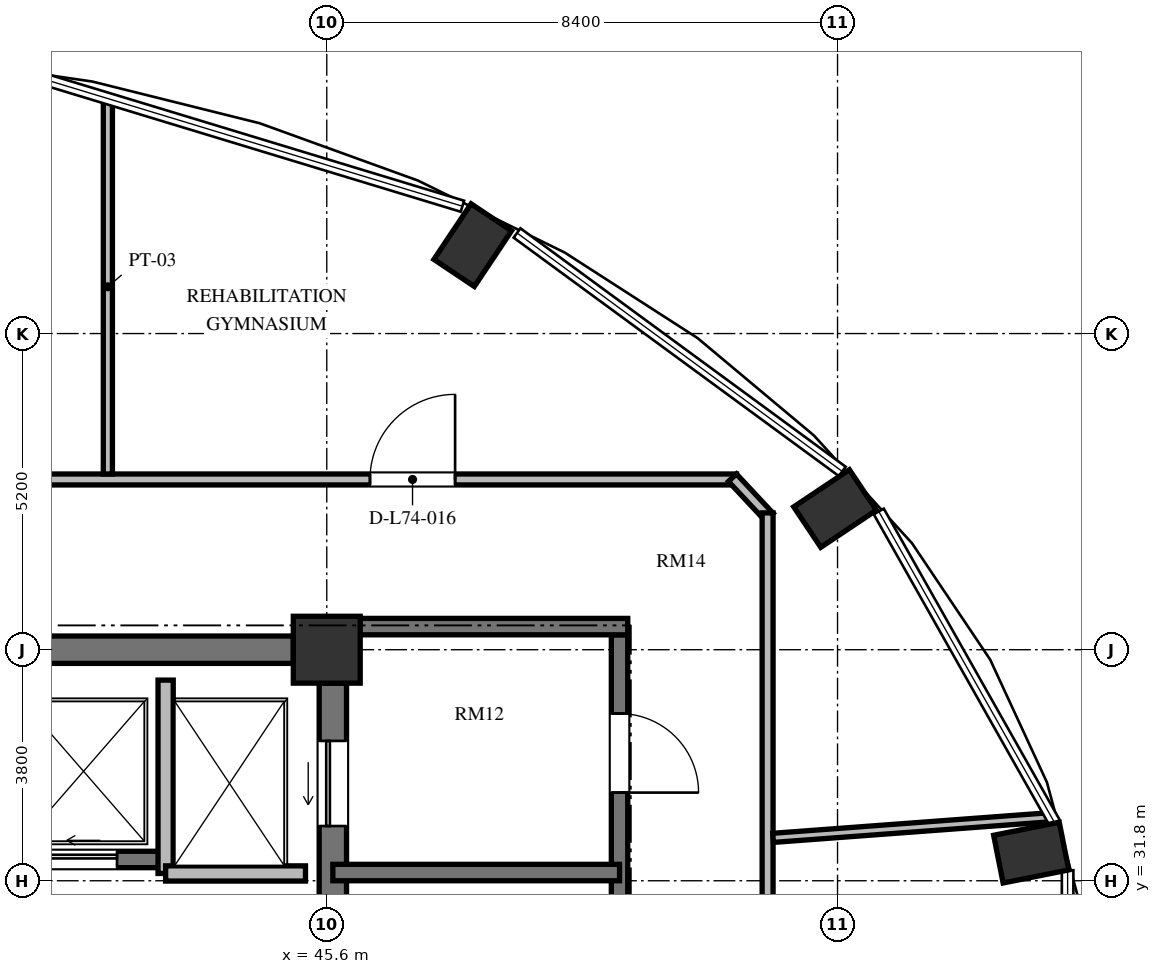
"""IFC4 building model, lengths in metres.
Left out: names, types, materials, properties, quantities, classifications, styles, units other than length and angle.
Written with IfcOpenShell. Run it as: python <this file> out.ifc"""

import sys

from ifc_helpers import new_model, si_unit, direction, frame, frame_2d, origin, origin_2d, place, context, subcontext, project, spatial, rectangle, extrude, element, fill, save


model = new_model("IFC4")
c1 = context("Model", 3, precision=1e-05, world=origin(), true_north=direction((0.0, 1.0)))
c2 = subcontext(c1, "Body", "Model", "MODEL_VIEW")
j1 = project(units=[si_unit("LENGTHUNIT", "METRE"), si_unit("PLANEANGLEUNIT", "RADIAN")], contexts=[c1])
p1 = place(None, origin())
s1 = spatial("IfcSite", under=j1, at=p1, CompositionType="ELEMENT")
p2 = place(p1, origin())
s2 = spatial("IfcBuilding", under=s1, at=p2, CompositionType="ELEMENT")
p3 = place(p2, frame((0.0, 0.0, 284.208)))
s3 = spatial("IfcBuildingStorey", under=s2, at=p3, CompositionType="ELEMENT", Elevation=284.208)
for number, where, z_axis, x_axis in (
    (1, (57.185, 32.263, 0.0), (0.0, 0.0, 1.0), (0.981, 0.195, 0.0)),
    (2, (53.96, 37.923, 0.0), (0.0, 0.0, 1.0), (0.831, 0.556, 0.0)),
    (3, (48.0, 42.254, 0.0), (0.0, 0.0, 1.0), (0.556, 0.831, 0.0)),
):
    element("IfcColumn", number, at=place(p3, frame(where, z_axis=z_axis, x_axis=x_axis)), inside=s3, PredefinedType="COLUMN", context=c2, shape_type="SweptSolid", body=[
        extrude(rectangle(XDim=1.1, YDim=0.8, at=origin_2d()), origin(), (0.0, 0.0, 1.0), 3.648),
    ])
p4 = place(p3, frame((45.6, 35.6, 0.0), z_axis=(0.0, 0.0, 1.0), x_axis=(1.0, 0.0, 0.0)))
e4 = element("IfcColumn", 4, at=p4, inside=s3, PredefinedType="COLUMN", context=c2, shape_type="SweptSolid", body=[
    extrude(rectangle(XDim=1.1, YDim=1.1, at=origin_2d()), origin(), (0.0, 0.0, 1.0), 3.648),
])
p5 = place(p3, frame((45.7, 20.95, 0.0), z_axis=(0.0, 0.0, 1.0), x_axis=(0.0, 1.0, 0.0)))
e5 = element("IfcWall", 5, at=p5, inside=s3, PredefinedType="SHEAR", context=c2, shape_type="SweptSolid", body=[
    extrude(rectangle(XDim=14.1, YDim=0.45, at=frame_2d((7.05, 0.0))), origin(), (0.0, 0.0, 1.0), 3.648),
])
p6 = place(p5, frame((11.75, 0.0, 0.0)))
e6 = element("IfcOpeningElement", 6, at=p6, cuts=e5, PredefinedType="OPENING", context=c2, shape_type="SweptSolid", body=[
    extrude(rectangle(XDim=1.4, YDim=2.3, at=frame_2d((0.7, 1.15))), frame((0.0, 0.235, 0.0), z_axis=(0.0, -1.0, 0.0), x_axis=(1.0, 0.0, 0.0)), (0.0, 0.0, 1.0), 0.47),
])
p7 = place(p5, frame((0.95, 0.0, 0.0)))
e7 = element("IfcOpeningElement", 7, at=p7, cuts=e5, PredefinedType="OPENING", context=c2, shape_type="SweptSolid", body=[
    extrude(rectangle(XDim=1.4, YDim=2.3, at=frame_2d((0.7, 1.15))), frame((0.0, 0.235, 0.0), z_axis=(0.0, -1.0, 0.0), x_axis=(1.0, 0.0, 0.0)), (0.0, 0.0, 1.0), 0.47),
])
p8 = place(p3, frame((39.6, 35.6, 0.0), z_axis=(0.0, 0.0, 1.0), x_axis=(1.0, 0.0, 0.0)))
e8 = element("IfcWall", 8, at=p8, inside=s3, PredefinedType="SHEAR", context=c2, shape_type="SweptSolid", body=[
    extrude(rectangle(XDim=5.45, YDim=0.45, at=frame_2d((2.725, 0.0))), origin(), (0.0, 0.0, 1.0), 3.648),
])
p9 = place(p3, frame((26.55, 32.15, 0.0), z_axis=(0.0, 0.0, 1.0), x_axis=(1.0, 0.0, 0.0)))
e9 = element("IfcWall", 9, at=p9, inside=s3, PredefinedType="SHEAR", context=c2, shape_type="SweptSolid", body=[
    extrude(rectangle(XDim=16.4, YDim=0.27, at=frame_2d((8.2, 0.0))), origin(), (0.0, 0.0, 1.0), 3.648),
])
p10 = place(p9, frame((1.375, 0.0, 0.0)))
e10 = element("IfcOpeningElement", 10, at=p10, cuts=e9, PredefinedType="OPENING", context=c2, shape_type="SweptSolid", body=[
    extrude(rectangle(XDim=1.05, YDim=2.15, at=frame_2d((0.525, 1.075))), frame((0.0, 0.145, 0.0), z_axis=(0.0, -1.0, 0.0), x_axis=(1.0, 0.0, 0.0)), (0.0, 0.0, 1.0), 0.29),
])
p11 = place(p9, frame((4.975, 0.0, 0.0)))
e11 = element("IfcOpeningElement", 11, at=p11, cuts=e9, PredefinedType="OPENING", context=c2, shape_type="SweptSolid", body=[
    extrude(rectangle(XDim=1.05, YDim=2.15, at=frame_2d((0.525, 1.075))), frame((0.0, 0.145, 0.0), z_axis=(0.0, -1.0, 0.0), x_axis=(1.0, 0.0, 0.0)), (0.0, 0.0, 1.0), 0.29),
])
p12 = place(p9, frame((8.625, 0.0, 0.0)))
e12 = element("IfcOpeningElement", 12, at=p12, cuts=e9, PredefinedType="OPENING", context=c2, shape_type="SweptSolid", body=[
    extrude(rectangle(XDim=1.05, YDim=2.15, at=frame_2d((0.525, 1.075))), frame((0.0, 0.145, 0.0), z_axis=(0.0, -1.0, 0.0), x_axis=(1.0, 0.0, 0.0)), (0.0, 0.0, 1.0), 0.29),
])
p13 = place(p9, frame((11.9, 0.0, 0.0)))
e13 = element("IfcOpeningElement", 13, at=p13, cuts=e9, PredefinedType="OPENING", context=c2, shape_type="SweptSolid", body=[
    extrude(rectangle(XDim=1.1, YDim=2.2, at=frame_2d((0.55, 1.1))), frame((0.0, 0.145, 0.0), z_axis=(0.0, -1.0, 0.0), x_axis=(1.0, 0.0, 0.0)), (0.0, 0.0, 1.0), 0.29),
])
p14 = place(p9, frame((14.5, 0.0, 0.0)))
e14 = element("IfcOpeningElement", 14, at=p14, cuts=e9, PredefinedType="OPENING", context=c2, shape_type="SweptSolid", body=[
    extrude(rectangle(XDim=1.1, YDim=2.2, at=frame_2d((0.55, 1.1))), frame((0.0, 0.145, 0.0), z_axis=(0.0, -1.0, 0.0), x_axis=(1.0, 0.0, 0.0)), (0.0, 0.0, 1.0), 0.29),
])
p15 = place(p3, frame((42.95, 31.92, 0.0), z_axis=(0.0, 0.0, 1.0), x_axis=(0.0, 1.0, 0.0)))
e15 = element("IfcWall", 15, at=p15, inside=s3, PredefinedType="SOLIDWALL", context=c2, shape_type="SweptSolid", body=[
    extrude(rectangle(XDim=3.18, YDim=0.25, at=frame_2d((1.59, 0.0))), origin(), (0.0, 0.0, 1.0), 3.448),
])
p16 = place(p3, frame((42.95, 31.92, 0.0), z_axis=(0.0, 0.0, 1.0), x_axis=(1.0, 0.0, 0.0)))
e16 = element("IfcWall", 16, at=p16, inside=s3, PredefinedType="SOLIDWALL", context=c2, shape_type="SweptSolid", body=[
    extrude(rectangle(XDim=2.3, YDim=0.25, at=frame_2d((1.15, 0.0))), origin(), (0.0, 0.0, 1.0), 3.448),
])
p17 = place(p3, frame((50.415, 35.845, 0.0), z_axis=(0.0, 0.0, 1.0), x_axis=(0.0, -1.0, 0.0)))
e17 = element("IfcWall", 17, at=p17, inside=s3, PredefinedType="SHEAR", context=c2, shape_type="SweptSolid", body=[
    extrude(rectangle(XDim=15.825, YDim=0.27, at=frame_2d((7.913, 0.0))), origin(), (0.0, 0.0, 1.0), 3.648),
])
p18 = place(p17, frame((4.445, 0.0, 0.0)))
e18 = element("IfcOpeningElement", 18, at=p18, cuts=e17, PredefinedType="OPENING", context=c2, shape_type="SweptSolid", body=[
    extrude(rectangle(XDim=1.2, YDim=2.15, at=frame_2d((0.6, 1.075))), frame((0.0, 0.145, 0.0), z_axis=(0.0, -1.0, 0.0), x_axis=(1.0, 0.0, 0.0)), (0.0, 0.0, 1.0), 0.29),
])
p19 = place(p17, frame((1.295, 0.0, 0.0)))
e19 = element("IfcOpeningElement", 19, at=p19, cuts=e17, PredefinedType="OPENING", context=c2, shape_type="SweptSolid", body=[
    extrude(rectangle(XDim=1.3, YDim=2.2, at=frame_2d((0.65, 1.1))), frame((0.0, 0.145, 0.0), z_axis=(0.0, -1.0, 0.0), x_axis=(1.0, 0.0, 0.0)), (0.0, 0.0, 1.0), 0.29),
])
p20 = place(p17, frame((13.095, 0.0, 0.0)))
e20 = element("IfcOpeningElement", 20, at=p20, cuts=e17, PredefinedType="OPENING", context=c2, shape_type="SweptSolid", body=[
    extrude(rectangle(XDim=1.3, YDim=2.2, at=frame_2d((0.65, 1.1))), frame((0.0, 0.145, 0.0), z_axis=(0.0, -1.0, 0.0), x_axis=(1.0, 0.0, 0.0)), (0.0, 0.0, 1.0), 0.29),
])
p21 = place(p3, frame((45.925, 35.98, 0.0), z_axis=(0.0, 0.0, 1.0), x_axis=(1.0, 0.0, 0.0)))
e21 = element("IfcWall", 21, at=p21, inside=s3, PredefinedType="SHEAR", context=c2, shape_type="SweptSolid", body=[
    extrude(rectangle(XDim=4.625, YDim=0.27, at=frame_2d((2.312, 0.0))), origin(), (0.0, 0.0, 1.0), 3.648),
])
p22 = place(p3, frame((45.7, 31.935, 0.0), z_axis=(0.0, 0.0, 1.0), x_axis=(1.0, 0.0, 0.0)))
e22 = element("IfcWall", 22, at=p22, inside=s3, PredefinedType="SHEAR", context=c2, shape_type="SweptSolid", body=[
    extrude(rectangle(XDim=4.715, YDim=0.27, at=frame_2d((2.357, 0.0))), origin(), (0.0, 0.0, 1.0), 3.648),
])
p23 = place(p3, frame((32.46, 38.4, 0.0), z_axis=(0.0, 0.0, 1.0), x_axis=(1.0, 0.0, 0.0)))
e23 = element("IfcWall", 23, at=p23, inside=s3, PredefinedType="PARTITIONING", context=c2, shape_type="SweptSolid", body=[
    extrude(rectangle(XDim=19.879, YDim=0.18, at=frame_2d((9.939, 0.0))), origin(), (0.0, 0.0, 1.0), 3.073),
])
p24 = place(p23, frame((13.851, 0.0, 0.0)))
e24 = element("IfcOpeningElement", 24, at=p24, cuts=e23, PredefinedType="OPENING", context=c2, shape_type="SweptSolid", body=[
    extrude(rectangle(XDim=1.4, YDim=2.2, at=frame_2d((0.7, 1.1))), frame((0.0, 0.1, 0.0), z_axis=(0.0, -1.0, 0.0), x_axis=(1.0, 0.0, 0.0)), (0.0, 0.0, 1.0), 0.2),
])
p25 = place(p23, frame((4.404, 0.0, 0.0)))
e25 = element("IfcOpeningElement", 25, at=p25, cuts=e23, PredefinedType="OPENING", context=c2, shape_type="SweptSolid", body=[
    extrude(rectangle(XDim=1.05, YDim=2.15, at=frame_2d((0.525, 1.075))), frame((0.0, 0.1, 0.0), z_axis=(0.0, -1.0, 0.0), x_axis=(1.0, 0.0, 0.0)), (0.0, 0.0, 1.0), 0.2),
])
p26 = place(p3, frame((52.272, 38.429, 0.0), z_axis=(0.0, 0.0, 1.0), x_axis=(0.682475113459, -0.730908831188, 0.0)))
e26 = element("IfcWall", 26, at=p26, inside=s3, PredefinedType="PARTITIONING", context=c2, shape_type="SweptSolid", body=[
    extrude(rectangle(XDim=0.887, YDim=0.18, at=frame_2d((0.444, 0.0))), origin(), (0.0, 0.0, 1.0), 3.448),
])
p27 = place(p3, frame((52.85, 37.85, 0.0), z_axis=(0.0, 0.0, 1.0), x_axis=(0.0, -1.0, 0.0)))
e27 = element("IfcWall", 27, at=p27, inside=s3, PredefinedType="PARTITIONING", context=c2, shape_type="SweptSolid", body=[
    extrude(rectangle(XDim=17.3, YDim=0.18, at=frame_2d((8.65, 0.0))), origin(), (0.0, 0.0, 1.0), 3.448),
])
p28 = place(p27, frame((8.076, 0.0, 0.0)))
e28 = element("IfcOpeningElement", 28, at=p28, cuts=e27, PredefinedType="OPENING", context=c2, shape_type="SweptSolid", body=[
    extrude(rectangle(XDim=1.05, YDim=2.15, at=frame_2d((0.525, 1.075))), frame((0.0, 0.1, 0.0), z_axis=(0.0, -1.0, 0.0), x_axis=(1.0, 0.0, 0.0)), (0.0, 0.0, 1.0), 0.2),
])
p29 = place(p3, frame((52.94, 32.506, 0.0), z_axis=(0.0, 0.0, 1.0), x_axis=(0.997246844083, 0.074153435301, 0.0)))
e29 = element("IfcWall", 29, at=p29, inside=s3, PredefinedType="PARTITIONING", context=c2, shape_type="SweptSolid", body=[
    extrude(rectangle(XDim=4.596, YDim=0.15, at=frame_2d((2.298, 0.0))), origin(), (0.0, 0.0, 1.0), 3.448),
])
p30 = place(p3, frame((42.0, 38.49, 0.0), z_axis=(0.0, 0.0, 1.0), x_axis=(0.0, 1.0, 0.0)))
e30 = element("IfcWall", 30, at=p30, inside=s3, PredefinedType="PARTITIONING", context=c2, shape_type="SweptSolid", body=[
    extrude(rectangle(XDim=6.158, YDim=0.15, at=frame_2d((3.079, 0.0))), origin(), (0.0, 0.0, 1.0), 3.448),
])
p31 = place(p14, origin())
e31 = element("IfcDoor", 31, at=p31, inside=s3, OperationType="SLIDING_TO_LEFT", PredefinedType="DOOR", context=c2, shape_type="SweptSolid", body=[
    extrude(rectangle(XDim=1.1, YDim=2.2, at=frame_2d((0.55, 1.1))), frame((0.0, 0.025, 0.0), z_axis=(0.0, -1.0, 0.0), x_axis=(1.0, 0.0, 0.0)), (0.0, 0.0, 1.0), 0.05),
])
fill(e14, e31)
p32 = place(p6, origin())
e32 = element("IfcDoor", 32, at=p32, inside=s3, OperationType="SLIDING_TO_LEFT", PredefinedType="DOOR", context=c2, shape_type="SweptSolid", body=[
    extrude(rectangle(XDim=1.4, YDim=2.3, at=frame_2d((0.7, 1.15))), frame((0.0, 0.025, 0.0), z_axis=(0.0, -1.0, 0.0), x_axis=(1.0, 0.0, 0.0)), (0.0, 0.0, 1.0), 0.05),
])
fill(e6, e32)
p33 = place(p19, origin())
e33 = element("IfcDoor", 33, at=p33, inside=s3, OperationType="SINGLE_SWING_RIGHT", PredefinedType="DOOR", context=c2, shape_type="SweptSolid", body=[
    extrude(rectangle(XDim=1.3, YDim=2.2, at=frame_2d((0.65, 1.1))), frame((0.0, 0.025, 0.0), z_axis=(0.0, -1.0, 0.0), x_axis=(1.0, 0.0, 0.0)), (0.0, 0.0, 1.0), 0.05),
])
fill(e19, e33)
p34 = place(p24, origin())
e34 = element("IfcDoor", 34, at=p34, inside=s3, OperationType="SINGLE_SWING_RIGHT", PredefinedType="DOOR", context=c2, shape_type="SweptSolid", body=[
    extrude(rectangle(XDim=1.4, YDim=2.2, at=frame_2d((0.7, 1.1))), frame((0.0, 0.025, 0.0), z_axis=(0.0, -1.0, 0.0), x_axis=(1.0, 0.0, 0.0)), (0.0, 0.0, 1.0), 0.05),
])
fill(e24, e34)
save(model, sys.argv[1])
